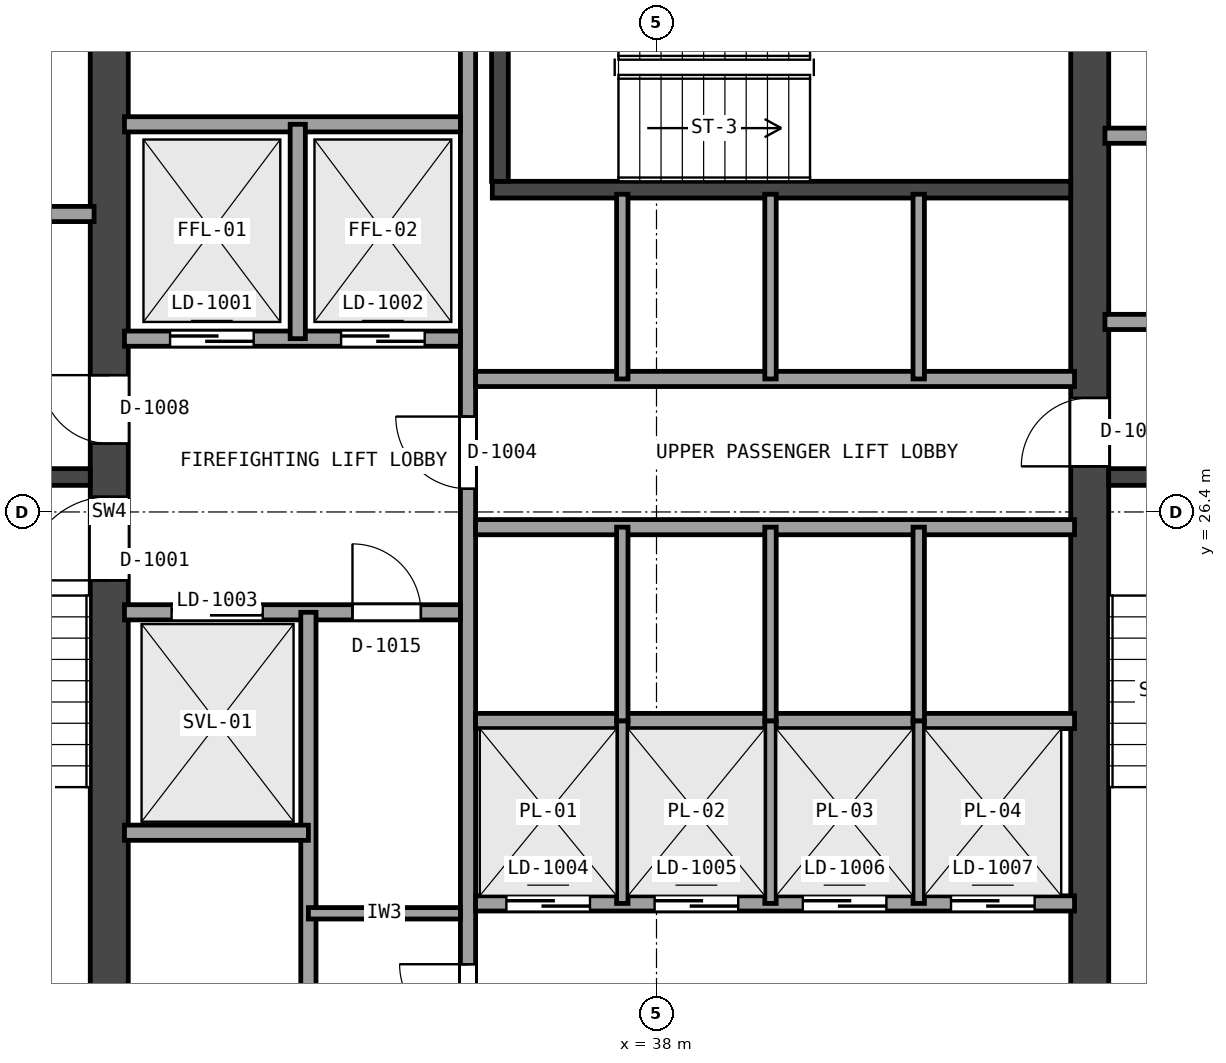
"""IFC4 building model, lengths in metres.
Left out: names, types, materials, properties, quantities, classifications, styles, units other than length and angle.
Written with IfcOpenShell. Run it as: python <this file> out.ifc"""

import sys

from ifc_helpers import new_model, si_unit, direction, frame, frame_2d, origin, place, context, subcontext, project, spatial, rectangle, extrude, element, fill, save


model = new_model("IFC4")
c1 = context("Model", 3, precision=1e-05, world=origin(), true_north=direction((0.0, 1.0)))
c2 = subcontext(c1, "Body", "Model", "MODEL_VIEW")
j1 = project(units=[si_unit("LENGTHUNIT", "METRE"), si_unit("PLANEANGLEUNIT", "RADIAN")], contexts=[c1])
p1 = place(None, origin())
s1 = spatial("IfcSite", under=j1, at=p1, CompositionType="ELEMENT")
p2 = place(p1, origin())
s2 = spatial("IfcBuilding", under=s1, at=p2, CompositionType="ELEMENT")
p3 = place(p2, frame((0.0, 0.0, 71.85)))
s3 = spatial("IfcBuildingStorey", under=s2, at=p3, CompositionType="ELEMENT", Elevation=71.85)
p4 = place(p3, frame((30.8, 18.925, 0.0), z_axis=(0.0, 0.0, 1.0), x_axis=(0.0, 1.0, 0.0)))
e1 = element("IfcWall", 1, at=p4, inside=s3, PredefinedType="SHEAR", context=c2, shape_type="SweptSolid", body=[
    extrude(rectangle(XDim=14.95, YDim=0.5, at=frame_2d((7.475, 0.0))), origin(), (0.0, 0.0, 1.0), 4.08),
])
p5 = place(p4, frame((6.575, 0.0, 0.0)))
e2 = element("IfcOpeningElement", 2, at=p5, cuts=e1, PredefinedType="OPENING", context=c2, shape_type="SweptSolid", body=[
    extrude(rectangle(XDim=1.1, YDim=2.15, at=frame_2d((0.55, 1.075))), frame((0.0, 0.26, 0.0), z_axis=(0.0, -1.0, 0.0), x_axis=(1.0, 0.0, 0.0)), (0.0, 0.0, 1.0), 0.52),
])
p6 = place(p4, frame((8.375, 0.0, 0.0)))
e3 = element("IfcOpeningElement", 3, at=p6, cuts=e1, PredefinedType="OPENING", context=c2, shape_type="SweptSolid", body=[
    extrude(rectangle(XDim=0.9, YDim=2.1, at=frame_2d((0.45, 1.05))), frame((0.0, 0.26, 0.0), z_axis=(0.0, -1.0, 0.0), x_axis=(1.0, 0.0, 0.0)), (0.0, 0.0, 1.0), 0.52),
])
p7 = place(p3, frame((43.7, 18.925, 0.0), z_axis=(0.0, 0.0, 1.0), x_axis=(0.0, 1.0, 0.0)))
e4 = element("IfcWall", 4, at=p7, inside=s3, PredefinedType="SHEAR", context=c2, shape_type="SweptSolid", body=[
    extrude(rectangle(XDim=14.95, YDim=0.5, at=frame_2d((7.475, 0.0))), origin(), (0.0, 0.0, 1.0), 4.08),
])
p8 = place(p7, frame((8.075, 0.0, 0.0)))
e5 = element("IfcOpeningElement", 5, at=p8, cuts=e4, PredefinedType="OPENING", context=c2, shape_type="SweptSolid", body=[
    extrude(rectangle(XDim=0.9, YDim=2.1, at=frame_2d((0.45, 1.05))), frame((0.0, 0.26, 0.0), z_axis=(0.0, -1.0, 0.0), x_axis=(1.0, 0.0, 0.0)), (0.0, 0.0, 1.0), 0.52),
])
p9 = place(p3, frame((27.125, 26.86, 0.0), z_axis=(0.0, 0.0, 1.0), x_axis=(1.0, 0.0, 0.0)))
e6 = element("IfcWall", 6, at=p9, inside=s3, PredefinedType="SHEAR", context=c2, shape_type="SweptSolid", body=[
    extrude(rectangle(XDim=3.425, YDim=0.22, at=frame_2d((1.712, 0.0))), origin(), (0.0, 0.0, 1.0), 4.08),
])
p10 = place(p3, frame((43.95, 26.86, 0.0), z_axis=(0.0, 0.0, 1.0), x_axis=(1.0, 0.0, 0.0)))
e7 = element("IfcWall", 7, at=p10, inside=s3, PredefinedType="SHEAR", context=c2, shape_type="SweptSolid", body=[
    extrude(rectangle(XDim=3.325, YDim=0.22, at=frame_2d((1.663, 0.0))), origin(), (0.0, 0.0, 1.0), 4.08),
])
p11 = place(p3, frame((35.84, 30.64, 0.0), z_axis=(0.0, 0.0, 1.0), x_axis=(1.0, 0.0, 0.0)))
e8 = element("IfcWall", 8, at=p11, inside=s3, PredefinedType="SHEAR", context=c2, shape_type="SweptSolid", body=[
    extrude(rectangle(XDim=7.61, YDim=0.22, at=frame_2d((3.805, 0.0))), origin(), (0.0, 0.0, 1.0), 4.08),
])
p12 = place(p3, frame((35.94, 30.75, 0.0), z_axis=(0.0, 0.0, 1.0), x_axis=(0.0, 1.0, 0.0)))
e9 = element("IfcWall", 9, at=p12, inside=s3, PredefinedType="SHEAR", context=c2, shape_type="SweptSolid", body=[
    extrude(rectangle(XDim=3.125, YDim=0.22, at=frame_2d((1.562, 0.0))), origin(), (0.0, 0.0, 1.0), 4.08),
])
p13 = place(p3, frame((27.15, 30.32, 0.0), z_axis=(0.0, 0.0, 1.0), x_axis=(1.0, 0.0, 0.0)))
e10 = element("IfcWall", 10, at=p13, inside=s3, PredefinedType="SOLIDWALL", context=c2, shape_type="SweptSolid", body=[
    extrude(rectangle(XDim=3.45, YDim=0.2, at=frame_2d((1.725, 0.0))), origin(), (0.0, 0.0, 1.0), 4.08),
])
p14 = place(p3, frame((43.9, 28.9, 0.0), z_axis=(0.0, 0.0, 1.0), x_axis=(1.0, 0.0, 0.0)))
e11 = element("IfcWall", 11, at=p14, inside=s3, PredefinedType="SOLIDWALL", context=c2, shape_type="SweptSolid", body=[
    extrude(rectangle(XDim=3.35, YDim=0.2, at=frame_2d((1.675, 0.0))), origin(), (0.0, 0.0, 1.0), 4.08),
])
p15 = place(p14, frame((1.15, 0.0, 0.0)))
e12 = element("IfcOpeningElement", 12, at=p15, cuts=e11, PredefinedType="OPENING", context=c2, shape_type="SweptSolid", body=[
    extrude(rectangle(XDim=0.9, YDim=2.1, at=frame_2d((0.45, 1.05))), frame((0.0, 0.11, 0.0), z_axis=(0.0, -1.0, 0.0), x_axis=(1.0, 0.0, 0.0)), (0.0, 0.0, 1.0), 0.22),
])
p16 = place(p3, frame((43.9, 31.35, 0.0), z_axis=(0.0, 0.0, 1.0), x_axis=(1.0, 0.0, 0.0)))
e13 = element("IfcWall", 13, at=p16, inside=s3, PredefinedType="SOLIDWALL", context=c2, shape_type="SweptSolid", body=[
    extrude(rectangle(XDim=3.35, YDim=0.2, at=frame_2d((1.675, 0.0))), origin(), (0.0, 0.0, 1.0), 4.08),
])
p17 = place(p3, frame((35.52, 18.95, 0.0), z_axis=(0.0, 0.0, 1.0), x_axis=(0.0, 1.0, 0.0)))
e14 = element("IfcWall", 14, at=p17, inside=s3, PredefinedType="SOLIDWALL", context=c2, shape_type="SweptSolid", body=[
    extrude(rectangle(XDim=14.9, YDim=0.2, at=frame_2d((7.45, 0.0))), origin(), (0.0, 0.0, 1.0), 3.601),
])
p18 = place(p17, frame((7.755, 0.0, 0.0)))
e15 = element("IfcOpeningElement", 15, at=p18, cuts=e14, PredefinedType="OPENING", context=c2, shape_type="SweptSolid", body=[
    extrude(rectangle(XDim=0.95, YDim=2.15, at=frame_2d((0.475, 1.075))), frame((0.0, 0.11, 0.0), z_axis=(0.0, -1.0, 0.0), x_axis=(1.0, 0.0, 0.0)), (0.0, 0.0, 1.0), 0.22),
])
p19 = place(p17, frame((0.6, 0.0, 0.0)))
e16 = element("IfcOpeningElement", 16, at=p19, cuts=e14, PredefinedType="OPENING", context=c2, shape_type="SweptSolid", body=[
    extrude(rectangle(XDim=0.9, YDim=2.1, at=frame_2d((0.45, 1.05))), frame((0.0, 0.11, 0.0), z_axis=(0.0, -1.0, 0.0), x_axis=(1.0, 0.0, 0.0)), (0.0, 0.0, 1.0), 0.22),
])
p20 = place(p3, frame((31.0, 28.68, 0.0), z_axis=(0.0, 0.0, 1.0), x_axis=(1.0, 0.0, 0.0)))
e17 = element("IfcWall", 17, at=p20, inside=s3, PredefinedType="SOLIDWALL", context=c2, shape_type="SweptSolid", body=[
    extrude(rectangle(XDim=4.42, YDim=0.2, at=frame_2d((2.21, 0.0))), origin(), (0.0, 0.0, 1.0), 4.08),
])
p21 = place(p20, frame((0.6, 0.0, 0.0)))
e18 = element("IfcOpeningElement", 18, at=p21, cuts=e17, PredefinedType="OPENING", context=c2, shape_type="SweptSolid", body=[
    extrude(rectangle(XDim=1.1, YDim=2.15, at=frame_2d((0.55, 1.075))), frame((0.0, 0.11, 0.0), z_axis=(0.0, -1.0, 0.0), x_axis=(1.0, 0.0, 0.0)), (0.0, 0.0, 1.0), 0.22),
])
p22 = place(p20, frame((2.85, 0.0, 0.0)))
e19 = element("IfcOpeningElement", 19, at=p22, cuts=e17, PredefinedType="OPENING", context=c2, shape_type="SweptSolid", body=[
    extrude(rectangle(XDim=1.1, YDim=2.15, at=frame_2d((0.55, 1.075))), frame((0.0, 0.11, 0.0), z_axis=(0.0, -1.0, 0.0), x_axis=(1.0, 0.0, 0.0)), (0.0, 0.0, 1.0), 0.22),
])
p23 = place(p3, frame((31.0, 31.5, 0.0), z_axis=(0.0, 0.0, 1.0), x_axis=(1.0, 0.0, 0.0)))
e20 = element("IfcWall", 20, at=p23, inside=s3, PredefinedType="SOLIDWALL", context=c2, shape_type="SweptSolid", body=[
    extrude(rectangle(XDim=4.42, YDim=0.2, at=frame_2d((2.21, 0.0))), origin(), (0.0, 0.0, 1.0), 4.08),
])
p24 = place(p3, frame((33.28, 28.68, 0.0), z_axis=(0.0, 0.0, 1.0), x_axis=(0.0, 1.0, 0.0)))
e21 = element("IfcWall", 21, at=p24, inside=s3, PredefinedType="SOLIDWALL", context=c2, shape_type="SweptSolid", body=[
    extrude(rectangle(XDim=2.82, YDim=0.2, at=frame_2d((1.41, 0.0))), origin(), (0.0, 0.0, 1.0), 4.08),
])
p25 = place(p3, frame((31.0, 25.08, 0.0), z_axis=(0.0, 0.0, 1.0), x_axis=(1.0, 0.0, 0.0)))
e22 = element("IfcWall", 22, at=p25, inside=s3, PredefinedType="SOLIDWALL", context=c2, shape_type="SweptSolid", body=[
    extrude(rectangle(XDim=4.42, YDim=0.2, at=frame_2d((2.21, 0.0))), origin(), (0.0, 0.0, 1.0), 4.08),
])
p26 = place(p25, frame((3.0, 0.0, 0.0)))
e23 = element("IfcOpeningElement", 23, at=p26, cuts=e22, PredefinedType="OPENING", context=c2, shape_type="SweptSolid", body=[
    extrude(rectangle(XDim=0.9, YDim=2.1, at=frame_2d((0.45, 1.05))), frame((0.0, 0.11, 0.0), z_axis=(0.0, -1.0, 0.0), x_axis=(1.0, 0.0, 0.0)), (0.0, 0.0, 1.0), 0.22),
])
p27 = place(p25, frame((0.62, 0.0, 0.0)))
e24 = element("IfcOpeningElement", 24, at=p27, cuts=e22, PredefinedType="OPENING", context=c2, shape_type="SweptSolid", body=[
    extrude(rectangle(XDim=1.2, YDim=2.15, at=frame_2d((0.6, 1.075))), frame((0.0, 0.11, 0.0), z_axis=(0.0, -1.0, 0.0), x_axis=(1.0, 0.0, 0.0)), (0.0, 0.0, 1.0), 0.22),
])
p28 = place(p3, frame((33.42, 18.95, 0.0), z_axis=(0.0, 0.0, 1.0), x_axis=(0.0, 1.0, 0.0)))
e25 = element("IfcWall", 25, at=p28, inside=s3, PredefinedType="SOLIDWALL", context=c2, shape_type="SweptSolid", body=[
    extrude(rectangle(XDim=6.13, YDim=0.2, at=frame_2d((3.065, 0.0))), origin(), (0.0, 0.0, 1.0), 3.601),
])
p29 = place(p3, frame((31.0, 22.18, 0.0), z_axis=(0.0, 0.0, 1.0), x_axis=(1.0, 0.0, 0.0)))
e26 = element("IfcWall", 26, at=p29, inside=s3, PredefinedType="SOLIDWALL", context=c2, shape_type="SweptSolid", body=[
    extrude(rectangle(XDim=2.42, YDim=0.2, at=frame_2d((1.21, 0.0))), origin(), (0.0, 0.0, 1.0), 4.08),
])
p30 = place(p3, frame((33.42, 21.12, 0.0), z_axis=(0.0, 0.0, 1.0), x_axis=(1.0, 0.0, 0.0)))
e27 = element("IfcWall", 27, at=p30, inside=s3, PredefinedType="PARTITIONING", context=c2, shape_type="SweptSolid", body=[
    extrude(rectangle(XDim=2.0, YDim=0.15, at=frame_2d((1.0, 0.0))), origin(), (0.0, 0.0, 1.0), 4.08),
])
for number, where, z_axis, x_axis in (
    (28, (35.62, 28.15, 0.0), (0.0, 0.0, 1.0), (1.0, 0.0, 0.0)),
    (29, (35.62, 26.2, 0.0), (0.0, 0.0, 1.0), (1.0, 0.0, 0.0)),
):
    element("IfcWall", number, at=place(p3, frame(where, z_axis=z_axis, x_axis=x_axis)), inside=s3, PredefinedType="SOLIDWALL", context=c2, shape_type="SweptSolid", body=[
        extrude(rectangle(XDim=7.88, YDim=0.2, at=frame_2d((3.94, 0.0))), origin(), (0.0, 0.0, 1.0), 4.08),
    ])
p31 = place(p3, frame((35.62, 23.65, 0.0), z_axis=(0.0, 0.0, 1.0), x_axis=(1.0, 0.0, 0.0)))
e30 = element("IfcWall", 30, at=p31, inside=s3, PredefinedType="SOLIDWALL", context=c2, shape_type="SweptSolid", body=[
    extrude(rectangle(XDim=7.88, YDim=0.2, at=frame_2d((3.94, 0.0))), origin(), (0.0, 0.0, 1.0), 3.601),
])
p32 = place(p3, frame((35.62, 21.25, 0.0), z_axis=(0.0, 0.0, 1.0), x_axis=(1.0, 0.0, 0.0)))
e31 = element("IfcWall", 31, at=p32, inside=s3, PredefinedType="SOLIDWALL", context=c2, shape_type="SweptSolid", body=[
    extrude(rectangle(XDim=7.88, YDim=0.2, at=frame_2d((3.94, 0.0))), origin(), (0.0, 0.0, 1.0), 4.08),
])
p33 = place(p32, frame((0.405, 0.0, 0.0)))
e32 = element("IfcOpeningElement", 32, at=p33, cuts=e31, PredefinedType="OPENING", context=c2, shape_type="SweptSolid", body=[
    extrude(rectangle(XDim=1.1, YDim=2.15, at=frame_2d((0.55, 1.075))), frame((0.0, 0.11, 0.0), z_axis=(0.0, -1.0, 0.0), x_axis=(1.0, 0.0, 0.0)), (0.0, 0.0, 1.0), 0.22),
])
p34 = place(p32, frame((2.355, 0.0, 0.0)))
e33 = element("IfcOpeningElement", 33, at=p34, cuts=e31, PredefinedType="OPENING", context=c2, shape_type="SweptSolid", body=[
    extrude(rectangle(XDim=1.1, YDim=2.15, at=frame_2d((0.55, 1.075))), frame((0.0, 0.11, 0.0), z_axis=(0.0, -1.0, 0.0), x_axis=(1.0, 0.0, 0.0)), (0.0, 0.0, 1.0), 0.22),
])
p35 = place(p32, frame((4.305, 0.0, 0.0)))
e34 = element("IfcOpeningElement", 34, at=p35, cuts=e31, PredefinedType="OPENING", context=c2, shape_type="SweptSolid", body=[
    extrude(rectangle(XDim=1.1, YDim=2.15, at=frame_2d((0.55, 1.075))), frame((0.0, 0.11, 0.0), z_axis=(0.0, -1.0, 0.0), x_axis=(1.0, 0.0, 0.0)), (0.0, 0.0, 1.0), 0.22),
])
p36 = place(p32, frame((6.255, 0.0, 0.0)))
e35 = element("IfcOpeningElement", 35, at=p36, cuts=e31, PredefinedType="OPENING", context=c2, shape_type="SweptSolid", body=[
    extrude(rectangle(XDim=1.1, YDim=2.15, at=frame_2d((0.55, 1.075))), frame((0.0, 0.11, 0.0), z_axis=(0.0, -1.0, 0.0), x_axis=(1.0, 0.0, 0.0)), (0.0, 0.0, 1.0), 0.22),
])
for number, where, z_axis, x_axis in (
    (36, (37.55, 28.15, 0.0), (0.0, 0.0, 1.0), (0.0, 1.0, 0.0)),
    (37, (39.5, 28.15, 0.0), (0.0, 0.0, 1.0), (0.0, 1.0, 0.0)),
    (38, (41.45, 28.15, 0.0), (0.0, 0.0, 1.0), (0.0, 1.0, 0.0)),
):
    element("IfcWall", number, at=place(p3, frame(where, z_axis=z_axis, x_axis=x_axis)), inside=s3, PredefinedType="PARTITIONING", context=c2, shape_type="SweptSolid", body=[
        extrude(rectangle(XDim=2.43, YDim=0.15, at=frame_2d((1.215, 0.0))), origin(), (0.0, 0.0, 1.0), 4.08),
    ])
for number, where, z_axis, x_axis in (
    (39, (37.55, 23.65, 0.0), (0.0, 0.0, 1.0), (0.0, 1.0, 0.0)),
    (40, (39.5, 23.65, 0.0), (0.0, 0.0, 1.0), (0.0, 1.0, 0.0)),
    (41, (41.45, 23.65, 0.0), (0.0, 0.0, 1.0), (0.0, 1.0, 0.0)),
):
    element("IfcWall", number, at=place(p3, frame(where, z_axis=z_axis, x_axis=x_axis)), inside=s3, PredefinedType="PARTITIONING", context=c2, shape_type="SweptSolid", body=[
        extrude(rectangle(XDim=2.55, YDim=0.15, at=frame_2d((1.275, 0.0))), origin(), (0.0, 0.0, 1.0), 3.601),
    ])
for number, where, z_axis, x_axis in (
    (42, (37.55, 21.25, 0.0), (0.0, 0.0, 1.0), (0.0, 1.0, 0.0)),
    (43, (39.5, 21.25, 0.0), (0.0, 0.0, 1.0), (0.0, 1.0, 0.0)),
    (44, (41.45, 21.25, 0.0), (0.0, 0.0, 1.0), (0.0, 1.0, 0.0)),
):
    element("IfcWall", number, at=place(p3, frame(where, z_axis=z_axis, x_axis=x_axis)), inside=s3, PredefinedType="PARTITIONING", context=c2, shape_type="SweptSolid", body=[
        extrude(rectangle(XDim=2.4, YDim=0.15, at=frame_2d((1.2, 0.0))), origin(), (0.0, 0.0, 1.0), 3.601),
    ])
p37 = place(p5, origin())
e45 = element("IfcDoor", 45, at=p37, inside=s3, OperationType="SINGLE_SWING_RIGHT", PredefinedType="DOOR", context=c2, shape_type="SweptSolid", body=[
    extrude(rectangle(XDim=1.1, YDim=2.15, at=frame_2d((0.55, 1.075))), frame((0.0, 0.025, 0.0), z_axis=(0.0, -1.0, 0.0), x_axis=(1.0, 0.0, 0.0)), (0.0, 0.0, 1.0), 0.05),
])
fill(e2, e45)
p38 = place(p18, origin())
e46 = element("IfcDoor", 46, at=p38, inside=s3, OperationType="SINGLE_SWING_LEFT", PredefinedType="DOOR", context=c2, shape_type="SweptSolid", body=[
    extrude(rectangle(XDim=0.95, YDim=2.15, at=frame_2d((0.475, 1.075))), frame((0.0, 0.025, 0.0), z_axis=(0.0, -1.0, 0.0), x_axis=(1.0, 0.0, 0.0)), (0.0, 0.0, 1.0), 0.05),
])
fill(e15, e46)
p39 = place(p8, origin())
e47 = element("IfcDoor", 47, at=p39, inside=s3, OperationType="SINGLE_SWING_RIGHT", PredefinedType="DOOR", context=c2, shape_type="SweptSolid", body=[
    extrude(rectangle(XDim=0.9, YDim=2.1, at=frame_2d((0.45, 1.05))), frame((0.0, 0.025, 0.0), z_axis=(0.0, -1.0, 0.0), x_axis=(1.0, 0.0, 0.0)), (0.0, 0.0, 1.0), 0.05),
])
fill(e5, e47)
p40 = place(p6, origin())
e48 = element("IfcDoor", 48, at=p40, inside=s3, OperationType="SINGLE_SWING_LEFT", PredefinedType="DOOR", context=c2, shape_type="SweptSolid", body=[
    extrude(rectangle(XDim=0.9, YDim=2.1, at=frame_2d((0.45, 1.05))), frame((0.0, 0.025, 0.0), z_axis=(0.0, -1.0, 0.0), x_axis=(1.0, 0.0, 0.0)), (0.0, 0.0, 1.0), 0.05),
])
fill(e3, e48)
p41 = place(p19, origin())
e49 = element("IfcDoor", 49, at=p41, inside=s3, OperationType="SINGLE_SWING_LEFT", PredefinedType="DOOR", context=c2, shape_type="SweptSolid", body=[
    extrude(rectangle(XDim=0.9, YDim=2.1, at=frame_2d((0.45, 1.05))), frame((0.0, 0.025, 0.0), z_axis=(0.0, -1.0, 0.0), x_axis=(1.0, 0.0, 0.0)), (0.0, 0.0, 1.0), 0.05),
])
fill(e16, e49)
p42 = place(p26, origin())
e50 = element("IfcDoor", 50, at=p42, inside=s3, OperationType="SINGLE_SWING_RIGHT", PredefinedType="DOOR", context=c2, shape_type="SweptSolid", body=[
    extrude(rectangle(XDim=0.9, YDim=2.1, at=frame_2d((0.45, 1.05))), frame((0.0, 0.025, 0.0), z_axis=(0.0, -1.0, 0.0), x_axis=(1.0, 0.0, 0.0)), (0.0, 0.0, 1.0), 0.05),
])
fill(e23, e50)
p43 = place(p21, origin())
e51 = element("IfcDoor", 51, at=p43, inside=s3, OperationType="SLIDING_TO_LEFT", PredefinedType="DOOR", context=c2, shape_type="SweptSolid", body=[
    extrude(rectangle(XDim=1.1, YDim=2.15, at=frame_2d((0.55, 1.075))), frame((0.0, 0.025, 0.0), z_axis=(0.0, -1.0, 0.0), x_axis=(1.0, 0.0, 0.0)), (0.0, 0.0, 1.0), 0.05),
])
fill(e18, e51)
p44 = place(p22, origin())
e52 = element("IfcDoor", 52, at=p44, inside=s3, OperationType="SLIDING_TO_LEFT", PredefinedType="DOOR", context=c2, shape_type="SweptSolid", body=[
    extrude(rectangle(XDim=1.1, YDim=2.15, at=frame_2d((0.55, 1.075))), frame((0.0, 0.025, 0.0), z_axis=(0.0, -1.0, 0.0), x_axis=(1.0, 0.0, 0.0)), (0.0, 0.0, 1.0), 0.05),
])
fill(e19, e52)
p45 = place(p27, origin())
e53 = element("IfcDoor", 53, at=p45, inside=s3, OperationType="SLIDING_TO_LEFT", PredefinedType="DOOR", context=c2, shape_type="SweptSolid", body=[
    extrude(rectangle(XDim=1.2, YDim=2.15, at=frame_2d((0.6, 1.075))), frame((0.0, 0.025, 0.0), z_axis=(0.0, -1.0, 0.0), x_axis=(1.0, 0.0, 0.0)), (0.0, 0.0, 1.0), 0.05),
])
fill(e24, e53)
p46 = place(p33, origin())
e54 = element("IfcDoor", 54, at=p46, inside=s3, OperationType="SLIDING_TO_LEFT", PredefinedType="DOOR", context=c2, shape_type="SweptSolid", body=[
    extrude(rectangle(XDim=1.1, YDim=2.15, at=frame_2d((0.55, 1.075))), frame((0.0, 0.025, 0.0), z_axis=(0.0, -1.0, 0.0), x_axis=(1.0, 0.0, 0.0)), (0.0, 0.0, 1.0), 0.05),
])
fill(e32, e54)
p47 = place(p34, origin())
e55 = element("IfcDoor", 55, at=p47, inside=s3, OperationType="SLIDING_TO_LEFT", PredefinedType="DOOR", context=c2, shape_type="SweptSolid", body=[
    extrude(rectangle(XDim=1.1, YDim=2.15, at=frame_2d((0.55, 1.075))), frame((0.0, 0.025, 0.0), z_axis=(0.0, -1.0, 0.0), x_axis=(1.0, 0.0, 0.0)), (0.0, 0.0, 1.0), 0.05),
])
fill(e33, e55)
p48 = place(p35, origin())
e56 = element("IfcDoor", 56, at=p48, inside=s3, OperationType="SLIDING_TO_LEFT", PredefinedType="DOOR", context=c2, shape_type="SweptSolid", body=[
    extrude(rectangle(XDim=1.1, YDim=2.15, at=frame_2d((0.55, 1.075))), frame((0.0, 0.025, 0.0), z_axis=(0.0, -1.0, 0.0), x_axis=(1.0, 0.0, 0.0)), (0.0, 0.0, 1.0), 0.05),
])
fill(e34, e56)
p49 = place(p36, origin())
e57 = element("IfcDoor", 57, at=p49, inside=s3, OperationType="SLIDING_TO_LEFT", PredefinedType="DOOR", context=c2, shape_type="SweptSolid", body=[
    extrude(rectangle(XDim=1.1, YDim=2.15, at=frame_2d((0.55, 1.075))), frame((0.0, 0.025, 0.0), z_axis=(0.0, -1.0, 0.0), x_axis=(1.0, 0.0, 0.0)), (0.0, 0.0, 1.0), 0.05),
])
fill(e35, e57)
save(model, sys.argv[1])
